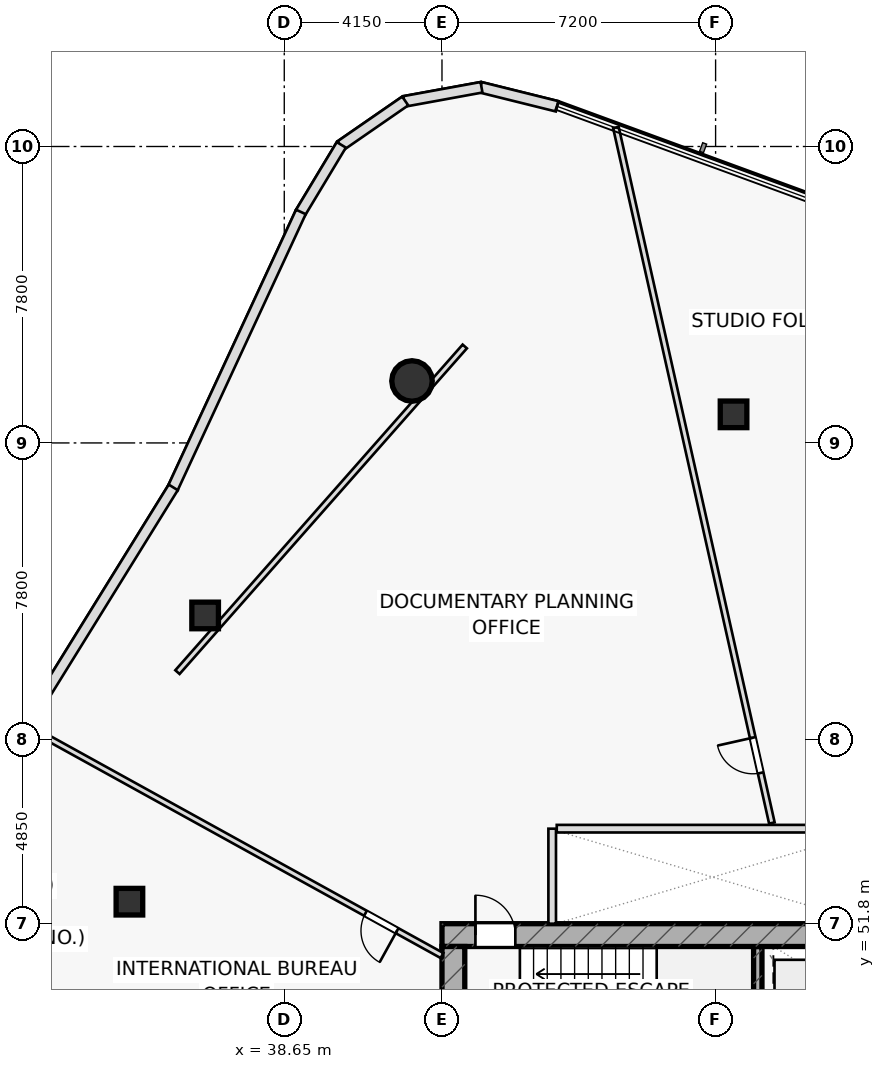
"""IFC4 building model, lengths in metres.
Left out: names, types, materials, properties, quantities, classifications, styles, units other than length and angle.
Written with IfcOpenShell. Run it as: python <this file> out.ifc"""

import sys

from ifc_helpers import new_model, si_unit, direction, frame, frame_2d, origin, origin_2d, place, context, subcontext, project, spatial, rectangle, hollow_rectangle, hollow_circle, extrude, element, fill, save


model = new_model("IFC4")
c1 = context("Model", 3, precision=1e-05, world=origin(), true_north=direction((0.0, 1.0)))
c2 = subcontext(c1, "Body", "Model", "MODEL_VIEW")
j1 = project(units=[si_unit("LENGTHUNIT", "METRE"), si_unit("PLANEANGLEUNIT", "RADIAN")], contexts=[c1])
p1 = place(None, origin())
s1 = spatial("IfcSite", under=j1, at=p1, CompositionType="ELEMENT")
p2 = place(p1, origin())
s2 = spatial("IfcBuilding", under=s1, at=p2, CompositionType="ELEMENT")
p3 = place(p2, frame((0.0, 0.0, 127.15)))
s3 = spatial("IfcBuildingStorey", under=s2, at=p3, CompositionType="ELEMENT", Elevation=127.15)
p4 = place(p3, frame((51.11, 48.1, 0.0), z_axis=(0.0, 0.0, 1.0), x_axis=(0.0, 1.0, 0.0)))
e1 = element("IfcWall", 1, at=p4, inside=s3, PredefinedType="SHEAR", context=c2, shape_type="SweptSolid", body=[
    extrude(rectangle(XDim=3.1, YDim=0.22, at=frame_2d((1.55, 0.0))), origin(), (0.0, 0.0, 1.0), 3.55),
])
p5 = place(p3, frame((42.8, 51.5, 0.0), z_axis=(0.0, 0.0, 1.0), x_axis=(1.0, 0.0, 0.0)))
e2 = element("IfcWall", 2, at=p5, inside=s3, PredefinedType="SHEAR", context=c2, shape_type="SweptSolid", body=[
    extrude(rectangle(XDim=14.4, YDim=0.6, at=frame_2d((7.2, 0.0))), origin(), (0.0, 0.0, 1.0), 3.55),
])
p6 = place(p5, frame((0.88, 0.0, 0.0)))
e3 = element("IfcOpeningElement", 3, at=p6, cuts=e2, PredefinedType="OPENING", context=c2, shape_type="SweptSolid", body=[
    extrude(rectangle(XDim=1.05, YDim=2.2, at=frame_2d((0.525, 1.1))), frame((0.0, 0.31, 0.0), z_axis=(0.0, -1.0, 0.0), x_axis=(1.0, 0.0, 0.0)), (0.0, 0.0, 1.0), 0.62),
])
p7 = place(p3, frame((43.1, 38.8, 0.0), z_axis=(0.0, 0.0, 1.0), x_axis=(0.0, 1.0, 0.0)))
e4 = element("IfcWall", 4, at=p7, inside=s3, PredefinedType="SHEAR", context=c2, shape_type="SweptSolid", body=[
    extrude(rectangle(XDim=12.4, YDim=0.6, at=frame_2d((6.2, 0.0))), origin(), (0.0, 0.0, 1.0), 3.55),
])
p8 = place(p3, frame((42.011, 66.08, 0.0), z_axis=(0.0, 0.0, 1.0), x_axis=(1.0, 0.0, 0.0)))
e5 = element("IfcColumn", 5, at=p8, inside=s3, PredefinedType="COLUMN", context=c2, shape_type="SweptSolid", body=[
    extrude(hollow_circle(Radius=0.533, WallThickness=0.045, at=origin_2d()), origin(), (0.0, 0.0, 1.0), 3.55),
])
for number, where, z_axis, x_axis in (
    (6, (36.568, 59.911, 0.0), (0.0, 0.0, 1.0), (1.0, 0.0, 0.0)),
    (7, (34.575, 52.379, 0.0), (0.0, 0.0, 1.0), (1.0, 0.0, 0.0)),
    (8, (50.472, 65.202, 0.0), (0.0, 0.0, 1.0), (1.0, 0.0, 0.0)),
):
    element("IfcColumn", number, at=place(p3, frame(where, z_axis=z_axis, x_axis=x_axis)), inside=s3, PredefinedType="COLUMN", context=c2, shape_type="SweptSolid", body=[
        extrude(hollow_rectangle(XDim=0.7, YDim=0.7, WallThickness=0.04, at=origin_2d()), origin(), (0.0, 0.0, 1.0), 3.55),
    ])
p9 = place(p3, frame((45.7, 51.8, 0.0), z_axis=(0.0, 0.0, 1.0), x_axis=(0.0, 1.0, 0.0)))
e9 = element("IfcWall", 9, at=p9, inside=s3, PredefinedType="PARTITIONING", context=c2, shape_type="SweptSolid", body=[
    extrude(rectangle(XDim=2.5, YDim=0.2, at=frame_2d((1.25, 0.0))), origin(), (0.0, 0.0, 1.0), 3.55),
])
p10 = place(p3, frame((43.4, 66.989, 0.0), z_axis=(0.0, 0.0, 1.0), x_axis=(-0.661622343701, -0.749837231881, 0.0)))
e10 = element("IfcWall", 10, at=p10, inside=s3, PredefinedType="PARTITIONING", context=c2, shape_type="SweptSolid", body=[
    extrude(rectangle(XDim=11.427, YDim=0.15, at=frame_2d((5.714, 0.0))), origin(), (0.0, 0.0, 1.0), 2.835),
])
p11 = place(p3, frame((51.481, 54.45, 0.0), z_axis=(0.0, 0.0, 1.0), x_axis=(-0.218833477921, 0.975762219468, 0.0)))
e11 = element("IfcWall", 11, at=p11, inside=s3, PredefinedType="PARTITIONING", context=c2, shape_type="SweptSolid", body=[
    extrude(rectangle(XDim=18.755, YDim=0.15, at=frame_2d((9.377, 0.0))), origin(), (0.0, 0.0, 1.0), 2.975),
])
p12 = place(p11, frame((1.35, 0.0, 0.0)))
e12 = element("IfcOpeningElement", 12, at=p12, cuts=e11, PredefinedType="OPENING", context=c2, shape_type="SweptSolid", body=[
    extrude(rectangle(XDim=0.95, YDim=2.05, at=frame_2d((0.475, 1.025))), frame((0.0, 0.085, 0.0), z_axis=(0.0, -1.0, 0.0), x_axis=(1.0, 0.0, 0.0)), (0.0, 0.0, 1.0), 0.17),
])
p13 = place(p3, frame((42.8, 50.963, 0.0), z_axis=(0.0, 0.0, 1.0), x_axis=(-0.875434937419, 0.483335980811, 0.0)))
e13 = element("IfcWall", 13, at=p13, inside=s3, PredefinedType="PARTITIONING", context=c2, shape_type="SweptSolid", body=[
    extrude(rectangle(XDim=12.526, YDim=0.15, at=frame_2d((6.263, 0.0))), origin(), (0.0, 0.0, 1.0), 2.835),
])
p14 = place(p13, frame((1.35, 0.0, 0.0)))
e14 = element("IfcOpeningElement", 14, at=p14, cuts=e13, PredefinedType="OPENING", context=c2, shape_type="SweptSolid", body=[
    extrude(rectangle(XDim=0.95, YDim=2.05, at=frame_2d((0.475, 1.025))), frame((0.0, 0.085, 0.0), z_axis=(0.0, -1.0, 0.0), x_axis=(1.0, 0.0, 0.0)), (0.0, 0.0, 1.0), 0.17),
])
p15 = place(p3, frame((45.829, 73.307, 0.0), z_axis=(0.0, 0.0, 1.0), x_axis=(-0.970527942711, 0.240988614706, 0.0)))
e15 = element("IfcWall", 15, at=p15, inside=s3, PredefinedType="STANDARD", context=c2, shape_type="SweptSolid", body=[
    extrude(rectangle(XDim=2.08, YDim=0.28, at=frame_2d((1.04, 0.0))), origin(), (0.0, 0.0, 1.0), 3.55),
])
p16 = place(p3, frame((43.84, 73.808, 0.0), z_axis=(0.0, 0.0, 1.0), x_axis=(-0.983729852677, -0.179654047969, 0.0)))
e16 = element("IfcWall", 16, at=p16, inside=s3, PredefinedType="STANDARD", context=c2, shape_type="SweptSolid", body=[
    extrude(rectangle(XDim=2.068, YDim=0.28, at=frame_2d((1.034, 0.0))), origin(), (0.0, 0.0, 1.0), 3.55),
])
p17 = place(p3, frame((41.833, 73.448, 0.0), z_axis=(0.0, 0.0, 1.0), x_axis=(-0.822578736654, -0.568651230549, 0.0)))
e17 = element("IfcWall", 17, at=p17, inside=s3, PredefinedType="STANDARD", context=c2, shape_type="SweptSolid", body=[
    extrude(rectangle(XDim=2.068, YDim=0.28, at=frame_2d((1.034, 0.0))), origin(), (0.0, 0.0, 1.0), 3.55),
])
p18 = place(p3, frame((40.151, 72.293, 0.0), z_axis=(0.0, 0.0, 1.0), x_axis=(-0.515765905159, -0.856729555388, 0.0)))
e18 = element("IfcWall", 18, at=p18, inside=s3, PredefinedType="STANDARD", context=c2, shape_type="SweptSolid", body=[
    extrude(rectangle(XDim=2.091, YDim=0.28, at=frame_2d((1.045, 0.0))), origin(), (0.0, 0.0, 1.0), 3.55),
])
p19 = place(p3, frame((39.087, 70.528, 0.0), z_axis=(0.0, 0.0, 1.0), x_axis=(-0.420650525929, -0.907222759324, 0.0)))
e19 = element("IfcWall", 19, at=p19, inside=s3, PredefinedType="STANDARD", context=c2, shape_type="SweptSolid", body=[
    extrude(rectangle(XDim=8.018, YDim=0.28, at=frame_2d((4.009, 0.0))), origin(), (0.0, 0.0, 1.0), 3.55),
])
p20 = place(p3, frame((35.729, 63.281, 0.0), z_axis=(0.0, 0.0, 1.0), x_axis=(-0.526853741448, -0.849955960696, 0.0)))
e20 = element("IfcWall", 20, at=p20, inside=s3, PredefinedType="STANDARD", context=c2, shape_type="SweptSolid", body=[
    extrude(rectangle(XDim=8.62, YDim=0.28, at=frame_2d((4.31, 0.0))), origin(), (0.0, 0.0, 1.0), 3.55),
])
p21 = place(p3, frame((45.82, 54.3, 0.0), z_axis=(0.0, 0.0, 1.0), x_axis=(1.0, 0.0, 0.0)))
e21 = element("IfcWall", 21, at=p21, inside=s3, PredefinedType="PARTITIONING", context=c2, shape_type="SweptSolid", body=[
    extrude(rectangle(XDim=8.31, YDim=0.2, at=frame_2d((4.155, 0.0))), origin(), (0.0, 0.0, 1.0), 3.55),
])
p22 = place(p6, origin())
e22 = element("IfcDoor", 22, at=p22, inside=s3, OperationType="SINGLE_SWING_LEFT", PredefinedType="DOOR", context=c2, shape_type="SweptSolid", body=[
    extrude(rectangle(XDim=1.05, YDim=2.2, at=frame_2d((0.525, 1.1))), frame((0.0, 0.025, 0.0), z_axis=(0.0, -1.0, 0.0), x_axis=(1.0, 0.0, 0.0)), (0.0, 0.0, 1.0), 0.05),
])
fill(e3, e22)
p23 = place(p12, origin())
e23 = element("IfcDoor", 23, at=p23, inside=s3, OperationType="SINGLE_SWING_RIGHT", PredefinedType="DOOR", context=c2, shape_type="SweptSolid", body=[
    extrude(rectangle(XDim=0.95, YDim=2.05, at=frame_2d((0.475, 1.025))), frame((0.0, 0.025, 0.0), z_axis=(0.0, -1.0, 0.0), x_axis=(1.0, 0.0, 0.0)), (0.0, 0.0, 1.0), 0.05),
])
fill(e12, e23)
p24 = place(p14, origin())
e24 = element("IfcDoor", 24, at=p24, inside=s3, OperationType="SINGLE_SWING_LEFT", PredefinedType="DOOR", context=c2, shape_type="SweptSolid", body=[
    extrude(rectangle(XDim=0.95, YDim=2.05, at=frame_2d((0.475, 1.025))), frame((0.0, 0.025, 0.0), z_axis=(0.0, -1.0, 0.0), x_axis=(1.0, 0.0, 0.0)), (0.0, 0.0, 1.0), 0.05),
])
fill(e14, e24)
save(model, sys.argv[1])
